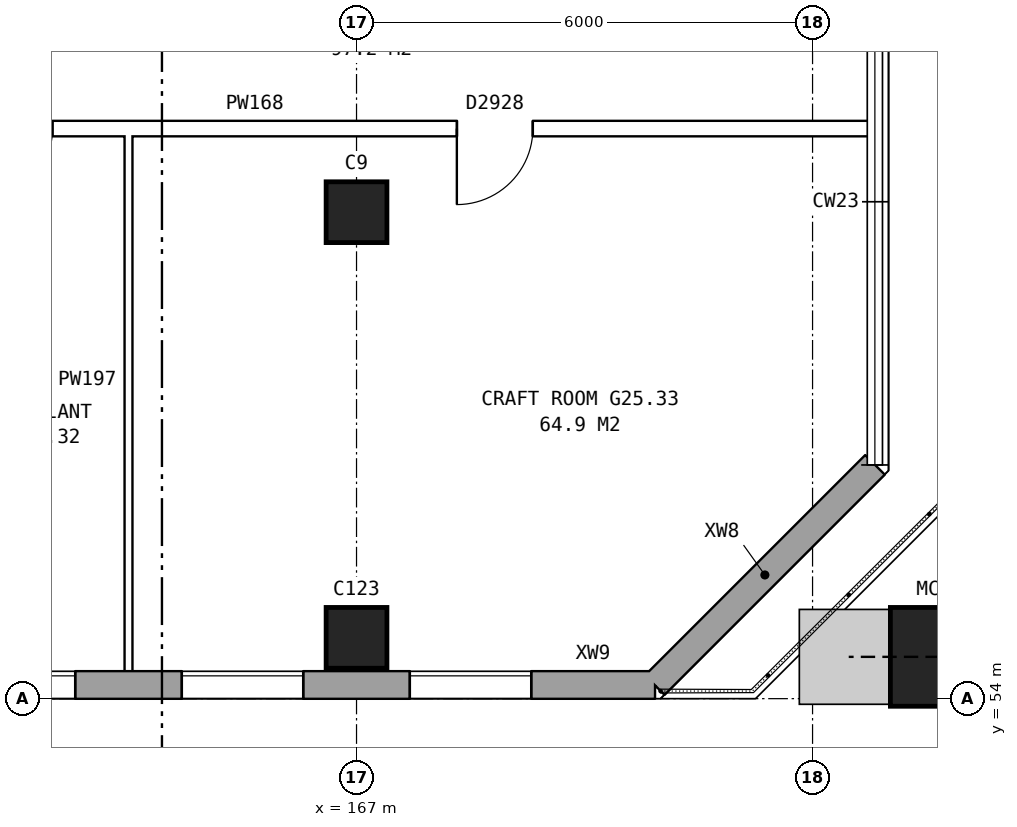
"""IFC4 building model, lengths in metres.
Left out: names, types, materials, properties, quantities, classifications, styles, units other than length and angle.
Written with IfcOpenShell. Run it as: python <this file> out.ifc"""

import sys

from ifc_helpers import new_model, si_unit, direction, frame, frame_2d, origin, origin_2d, place, context, subcontext, project, spatial, rectangle, hollow_rectangle, extrude, element, fill, save


model = new_model("IFC4")
c1 = context("Model", 3, precision=1e-05, world=origin(), true_north=direction((0.0, 1.0)))
c2 = subcontext(c1, "Body", "Model", "MODEL_VIEW")
j1 = project(units=[si_unit("LENGTHUNIT", "METRE"), si_unit("PLANEANGLEUNIT", "RADIAN")], contexts=[c1])
p1 = place(None, origin())
s1 = spatial("IfcSite", under=j1, at=p1, CompositionType="ELEMENT")
p2 = place(p1, origin())
s2 = spatial("IfcBuilding", under=s1, at=p2, CompositionType="ELEMENT")
p3 = place(p2, frame((0.0, 0.0, 90.2)))
s3 = spatial("IfcBuildingStorey", under=s2, at=p3, CompositionType="ELEMENT", Elevation=90.2)
for number, where, z_axis, x_axis in (
    (1, (167.0, 54.8, 0.0), (0.0, 0.0, 1.0), (1.0, 0.0, 0.0)),
    (2, (167.0, 60.4, 0.0), (0.0, 0.0, 1.0), (1.0, 0.0, 0.0)),
):
    element("IfcColumn", number, at=place(p3, frame(where, z_axis=z_axis, x_axis=x_axis)), inside=s3, PredefinedType="COLUMN", context=c2, shape_type="SweptSolid", body=[
        extrude(rectangle(XDim=0.8, YDim=0.8, at=origin_2d()), origin(), (0.0, 0.0, 1.0), 5.6),
    ])
p4 = place(p3, frame((174.674, 54.55, 0.129), z_axis=(-0.197649285048, 0.0, 0.980272798827), x_axis=(0.0, -1.0, 0.0)))
e3 = element("IfcColumn", 3, at=p4, inside=s3, PredefinedType="COLUMN", context=c2, shape_type="SweptSolid", body=[
    extrude(hollow_rectangle(XDim=1.3, YDim=1.3, WallThickness=0.07, at=origin_2d()), origin(), (0.0, 0.0, 1.0), 6.062),
])
p5 = place(p3, frame((134.075, 54.18, 0.0), z_axis=(0.0, 0.0, 1.0), x_axis=(1.0, 0.0, 0.0)))
e4 = element("IfcWall", 4, at=p5, inside=s3, PredefinedType="STANDARD", context=c2, shape_type="SweptSolid", body=[
    extrude(rectangle(XDim=36.851, YDim=0.36, at=frame_2d((18.425, 0.0))), origin(), (0.0, 0.0, 1.0), 5.6),
])
p6 = place(p5, frame((0.625, 0.0, 0.15)))
e5 = element("IfcOpeningElement", 5, at=p6, cuts=e4, PredefinedType="OPENING", context=c2, shape_type="SweptSolid", body=[
    extrude(rectangle(XDim=1.6, YDim=2.4, at=frame_2d((0.8, 1.2))), frame((0.0, 0.19, 0.0), z_axis=(0.0, -1.0, 0.0), x_axis=(1.0, 0.0, 0.0)), (0.0, 0.0, 1.0), 0.38),
])
p7 = place(p5, frame((3.625, 0.0, 0.15)))
e6 = element("IfcOpeningElement", 6, at=p7, cuts=e4, PredefinedType="OPENING", context=c2, shape_type="SweptSolid", body=[
    extrude(rectangle(XDim=1.6, YDim=2.4, at=frame_2d((0.8, 1.2))), frame((0.0, 0.19, 0.0), z_axis=(0.0, -1.0, 0.0), x_axis=(1.0, 0.0, 0.0)), (0.0, 0.0, 1.0), 0.38),
])
p8 = place(p5, frame((6.625, 0.0, 0.15)))
e7 = element("IfcOpeningElement", 7, at=p8, cuts=e4, PredefinedType="OPENING", context=c2, shape_type="SweptSolid", body=[
    extrude(rectangle(XDim=1.6, YDim=2.4, at=frame_2d((0.8, 1.2))), frame((0.0, 0.19, 0.0), z_axis=(0.0, -1.0, 0.0), x_axis=(1.0, 0.0, 0.0)), (0.0, 0.0, 1.0), 0.38),
])
p9 = place(p5, frame((9.625, 0.0, 0.15)))
e8 = element("IfcOpeningElement", 8, at=p9, cuts=e4, PredefinedType="OPENING", context=c2, shape_type="SweptSolid", body=[
    extrude(rectangle(XDim=1.6, YDim=2.4, at=frame_2d((0.8, 1.2))), frame((0.0, 0.19, 0.0), z_axis=(0.0, -1.0, 0.0), x_axis=(1.0, 0.0, 0.0)), (0.0, 0.0, 1.0), 0.38),
])
p10 = place(p5, frame((12.625, 0.0, 0.15)))
e9 = element("IfcOpeningElement", 9, at=p10, cuts=e4, PredefinedType="OPENING", context=c2, shape_type="SweptSolid", body=[
    extrude(rectangle(XDim=1.6, YDim=2.4, at=frame_2d((0.8, 1.2))), frame((0.0, 0.19, 0.0), z_axis=(0.0, -1.0, 0.0), x_axis=(1.0, 0.0, 0.0)), (0.0, 0.0, 1.0), 0.38),
])
p11 = place(p5, frame((15.625, 0.0, 0.15)))
e10 = element("IfcOpeningElement", 10, at=p11, cuts=e4, PredefinedType="OPENING", context=c2, shape_type="SweptSolid", body=[
    extrude(rectangle(XDim=1.6, YDim=2.4, at=frame_2d((0.8, 1.2))), frame((0.0, 0.19, 0.0), z_axis=(0.0, -1.0, 0.0), x_axis=(1.0, 0.0, 0.0)), (0.0, 0.0, 1.0), 0.38),
])
p12 = place(p5, frame((18.625, 0.0, 0.15)))
e11 = element("IfcOpeningElement", 11, at=p12, cuts=e4, PredefinedType="OPENING", context=c2, shape_type="SweptSolid", body=[
    extrude(rectangle(XDim=1.6, YDim=2.4, at=frame_2d((0.8, 1.2))), frame((0.0, 0.19, 0.0), z_axis=(0.0, -1.0, 0.0), x_axis=(1.0, 0.0, 0.0)), (0.0, 0.0, 1.0), 0.38),
])
p13 = place(p5, frame((21.625, 0.0, 0.15)))
e12 = element("IfcOpeningElement", 12, at=p13, cuts=e4, PredefinedType="OPENING", context=c2, shape_type="SweptSolid", body=[
    extrude(rectangle(XDim=1.6, YDim=2.4, at=frame_2d((0.8, 1.2))), frame((0.0, 0.19, 0.0), z_axis=(0.0, -1.0, 0.0), x_axis=(1.0, 0.0, 0.0)), (0.0, 0.0, 1.0), 0.38),
])
p14 = place(p5, frame((24.625, 0.0, 0.15)))
e13 = element("IfcOpeningElement", 13, at=p14, cuts=e4, PredefinedType="OPENING", context=c2, shape_type="SweptSolid", body=[
    extrude(rectangle(XDim=1.6, YDim=2.4, at=frame_2d((0.8, 1.2))), frame((0.0, 0.19, 0.0), z_axis=(0.0, -1.0, 0.0), x_axis=(1.0, 0.0, 0.0)), (0.0, 0.0, 1.0), 0.38),
])
p15 = place(p5, frame((27.625, 0.0, 0.15)))
e14 = element("IfcOpeningElement", 14, at=p15, cuts=e4, PredefinedType="OPENING", context=c2, shape_type="SweptSolid", body=[
    extrude(rectangle(XDim=1.6, YDim=2.4, at=frame_2d((0.8, 1.2))), frame((0.0, 0.19, 0.0), z_axis=(0.0, -1.0, 0.0), x_axis=(1.0, 0.0, 0.0)), (0.0, 0.0, 1.0), 0.38),
])
p16 = place(p5, frame((30.625, 0.0, 0.15)))
e15 = element("IfcOpeningElement", 15, at=p16, cuts=e4, PredefinedType="OPENING", context=c2, shape_type="SweptSolid", body=[
    extrude(rectangle(XDim=1.6, YDim=2.4, at=frame_2d((0.8, 1.2))), frame((0.0, 0.19, 0.0), z_axis=(0.0, -1.0, 0.0), x_axis=(1.0, 0.0, 0.0)), (0.0, 0.0, 1.0), 0.38),
])
p17 = place(p5, frame((33.625, 0.0, 0.15)))
e16 = element("IfcOpeningElement", 16, at=p17, cuts=e4, PredefinedType="OPENING", context=c2, shape_type="SweptSolid", body=[
    extrude(rectangle(XDim=1.6, YDim=2.4, at=frame_2d((0.8, 1.2))), frame((0.0, 0.19, 0.0), z_axis=(0.0, -1.0, 0.0), x_axis=(1.0, 0.0, 0.0)), (0.0, 0.0, 1.0), 0.38),
])
p18 = place(p3, frame((170.925, 54.18, 0.0), z_axis=(0.0, 0.0, 1.0), x_axis=(0.707106781187, 0.707106781187, 0.0)))
e17 = element("IfcWall", 17, at=p18, inside=s3, PredefinedType="STANDARD", context=c2, shape_type="SweptSolid", body=[
    extrude(rectangle(XDim=4.094, YDim=0.36, at=frame_2d((2.047, 0.0))), origin(), (0.0, 0.0, 1.0), 5.6),
])
p19 = place(p3, frame((131.24, 61.5, 0.0), z_axis=(0.0, 0.0, 1.0), x_axis=(1.0, 0.0, 0.0)))
e18 = element("IfcWall", 18, at=p19, inside=s3, PredefinedType="PARTITIONING", context=c2, shape_type="SweptSolid", body=[
    extrude(rectangle(XDim=42.52, YDim=0.2, at=frame_2d((21.26, 0.0))), origin(), (0.0, 0.0, 1.0), 5.6),
])
p20 = place(p19, frame((2.44, 0.0, 0.0)))
e19 = element("IfcOpeningElement", 19, at=p20, cuts=e18, PredefinedType="OPENING", context=c2, shape_type="SweptSolid", body=[
    extrude(rectangle(XDim=1.0, YDim=2.1, at=frame_2d((0.5, 1.05))), frame((0.0, 0.11, 0.0), z_axis=(0.0, -1.0, 0.0), x_axis=(1.0, 0.0, 0.0)), (0.0, 0.0, 1.0), 0.22),
])
p21 = place(p19, frame((8.26, 0.0, 0.0)))
e20 = element("IfcOpeningElement", 20, at=p21, cuts=e18, PredefinedType="OPENING", context=c2, shape_type="SweptSolid", body=[
    extrude(rectangle(XDim=1.0, YDim=2.1, at=frame_2d((0.5, 1.05))), frame((0.0, 0.11, 0.0), z_axis=(0.0, -1.0, 0.0), x_axis=(1.0, 0.0, 0.0)), (0.0, 0.0, 1.0), 0.22),
])
p22 = place(p19, frame((14.26, 0.0, 0.0)))
e21 = element("IfcOpeningElement", 21, at=p22, cuts=e18, PredefinedType="OPENING", context=c2, shape_type="SweptSolid", body=[
    extrude(rectangle(XDim=1.0, YDim=2.1, at=frame_2d((0.5, 1.05))), frame((0.0, 0.11, 0.0), z_axis=(0.0, -1.0, 0.0), x_axis=(1.0, 0.0, 0.0)), (0.0, 0.0, 1.0), 0.22),
])
p23 = place(p19, frame((20.26, 0.0, 0.0)))
e22 = element("IfcOpeningElement", 22, at=p23, cuts=e18, PredefinedType="OPENING", context=c2, shape_type="SweptSolid", body=[
    extrude(rectangle(XDim=1.0, YDim=2.1, at=frame_2d((0.5, 1.05))), frame((0.0, 0.11, 0.0), z_axis=(0.0, -1.0, 0.0), x_axis=(1.0, 0.0, 0.0)), (0.0, 0.0, 1.0), 0.22),
])
p24 = place(p19, frame((26.26, 0.0, 0.0)))
e23 = element("IfcOpeningElement", 23, at=p24, cuts=e18, PredefinedType="OPENING", context=c2, shape_type="SweptSolid", body=[
    extrude(rectangle(XDim=1.0, YDim=2.1, at=frame_2d((0.5, 1.05))), frame((0.0, 0.11, 0.0), z_axis=(0.0, -1.0, 0.0), x_axis=(1.0, 0.0, 0.0)), (0.0, 0.0, 1.0), 0.22),
])
p25 = place(p19, frame((30.76, 0.0, 0.0)))
e24 = element("IfcOpeningElement", 24, at=p25, cuts=e18, PredefinedType="OPENING", context=c2, shape_type="SweptSolid", body=[
    extrude(rectangle(XDim=1.0, YDim=2.1, at=frame_2d((0.5, 1.05))), frame((0.0, 0.11, 0.0), z_axis=(0.0, -1.0, 0.0), x_axis=(1.0, 0.0, 0.0)), (0.0, 0.0, 1.0), 0.22),
])
p26 = place(p19, frame((37.08, 0.0, 0.0)))
e25 = element("IfcOpeningElement", 25, at=p26, cuts=e18, PredefinedType="OPENING", context=c2, shape_type="SweptSolid", body=[
    extrude(rectangle(XDim=1.0, YDim=2.1, at=frame_2d((0.5, 1.05))), frame((0.0, 0.11, 0.0), z_axis=(0.0, -1.0, 0.0), x_axis=(1.0, 0.0, 0.0)), (0.0, 0.0, 1.0), 0.22),
])
p27 = place(p3, frame((164.0, 54.24, 0.0), z_axis=(0.0, 0.0, 1.0), x_axis=(0.0, 1.0, 0.0)))
e26 = element("IfcWall", 26, at=p27, inside=s3, PredefinedType="PARTITIONING", context=c2, shape_type="SweptSolid", body=[
    extrude(rectangle(XDim=7.36, YDim=0.1, at=frame_2d((3.68, 0.0))), origin(), (0.0, 0.0, 1.0), 5.6),
])
p28 = place(p15, origin())
e27 = element("IfcWindow", 27, at=p28, inside=s3, PartitioningType="SINGLE_PANEL", PredefinedType="WINDOW", context=c2, shape_type="SweptSolid", body=[
    extrude(rectangle(XDim=1.6, YDim=2.4, at=frame_2d((0.8, 1.2))), frame((0.0, 0.15, 0.0), z_axis=(0.0, -1.0, 0.0), x_axis=(1.0, 0.0, 0.0)), (0.0, 0.0, 1.0), 0.06),
])
fill(e14, e27)
p29 = place(p16, origin())
e28 = element("IfcWindow", 28, at=p29, inside=s3, PartitioningType="SINGLE_PANEL", PredefinedType="WINDOW", context=c2, shape_type="SweptSolid", body=[
    extrude(rectangle(XDim=1.6, YDim=2.4, at=frame_2d((0.8, 1.2))), frame((0.0, 0.15, 0.0), z_axis=(0.0, -1.0, 0.0), x_axis=(1.0, 0.0, 0.0)), (0.0, 0.0, 1.0), 0.06),
])
fill(e15, e28)
p30 = place(p17, origin())
e29 = element("IfcWindow", 29, at=p30, inside=s3, PartitioningType="SINGLE_PANEL", PredefinedType="WINDOW", context=c2, shape_type="SweptSolid", body=[
    extrude(rectangle(XDim=1.6, YDim=2.4, at=frame_2d((0.8, 1.2))), frame((0.0, 0.15, 0.0), z_axis=(0.0, -1.0, 0.0), x_axis=(1.0, 0.0, 0.0)), (0.0, 0.0, 1.0), 0.06),
])
fill(e16, e29)
p31 = place(p26, frame((1.0, 0.0, 0.0), z_axis=(0.0, 0.0, 1.0), x_axis=(-1.0, 0.0, 0.0)))
e30 = element("IfcDoor", 30, at=p31, inside=s3, OperationType="SINGLE_SWING_RIGHT", PredefinedType="DOOR", context=c2, shape_type="SweptSolid", body=[
    extrude(rectangle(XDim=1.0, YDim=2.1, at=frame_2d((0.5, 1.05))), frame((0.0, 0.025, 0.0), z_axis=(0.0, -1.0, 0.0), x_axis=(1.0, 0.0, 0.0)), (0.0, 0.0, 1.0), 0.05),
])
fill(e25, e30)
save(model, sys.argv[1])
